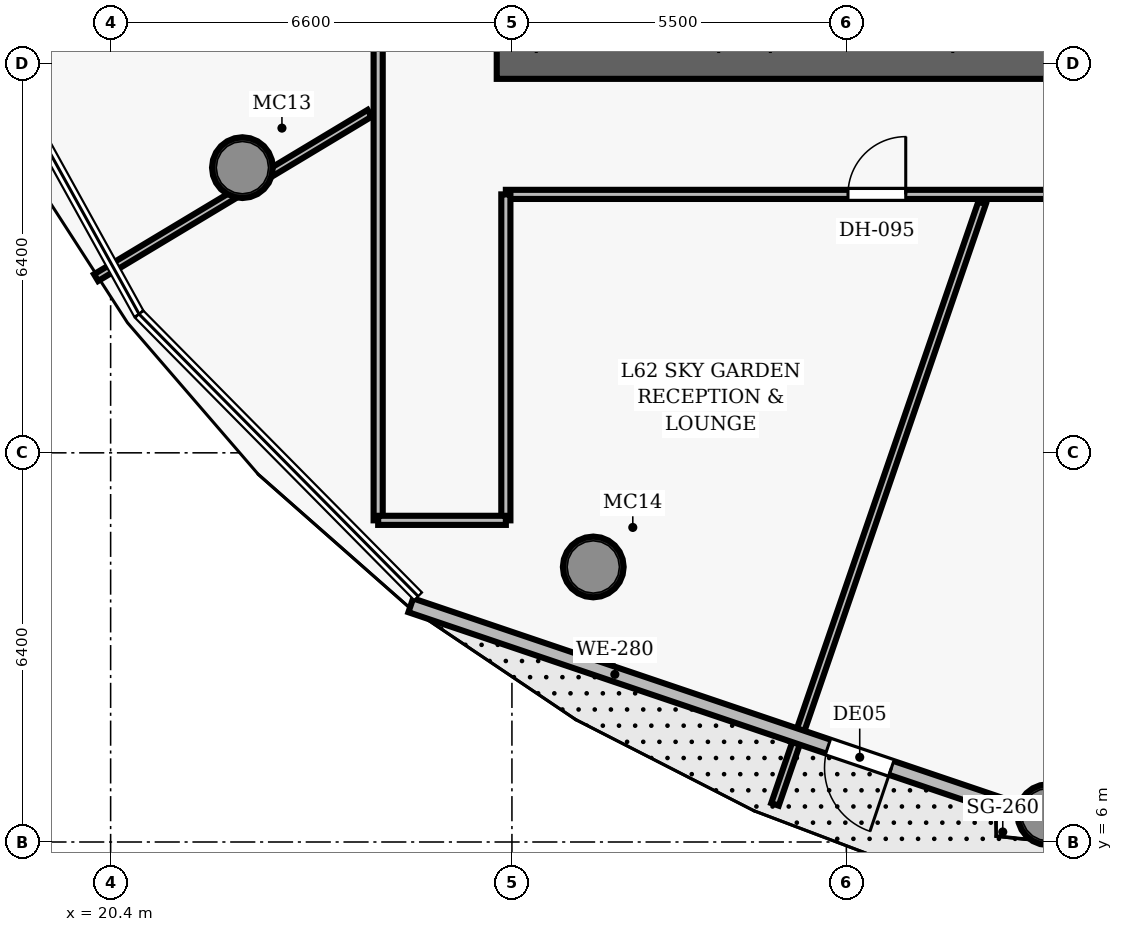
"""IFC4 building model, lengths in metres.
Left out: names, types, materials, properties, quantities, classifications, styles, units other than length and angle.
Written with IfcOpenShell. Run it as: python <this file> out.ifc"""

import sys

from ifc_helpers import new_model, si_unit, direction, frame, frame_2d, origin, origin_2d, place, context, subcontext, project, spatial, rectangle, hollow_circle, extrude, element, fill, save


model = new_model("IFC4")
c1 = context("Model", 3, precision=1e-05, world=origin(), true_north=direction((0.0, 1.0)))
c2 = subcontext(c1, "Body", "Model", "MODEL_VIEW")
j1 = project(units=[si_unit("LENGTHUNIT", "METRE"), si_unit("PLANEANGLEUNIT", "RADIAN")], contexts=[c1])
p1 = place(None, origin())
s1 = spatial("IfcSite", under=j1, at=p1, CompositionType="ELEMENT")
p2 = place(p1, origin())
s2 = spatial("IfcBuilding", under=s1, at=p2, CompositionType="ELEMENT")
p3 = place(p2, frame((0.0, 0.0, 245.9)))
s3 = spatial("IfcBuildingStorey", under=s2, at=p3, CompositionType="ELEMENT", Elevation=245.9)
p4 = place(p3, frame((26.75, 18.8, 0.0), z_axis=(0.0, 0.0, 1.0), x_axis=(1.0, 0.0, 0.0)))
e1 = element("IfcWall", 1, at=p4, inside=s3, PredefinedType="SHEAR", context=c2, shape_type="SweptSolid", body=[
    extrude(rectangle(XDim=22.5, YDim=0.5, at=frame_2d((11.25, 0.0))), origin(), (0.0, 0.0, 1.0), 3.85),
])
p5 = place(p4, frame((14.47, 0.0, 0.0)))
e2 = element("IfcOpeningElement", 2, at=p5, cuts=e1, PredefinedType="OPENING", context=c2, shape_type="SweptSolid", body=[
    extrude(rectangle(XDim=1.05, YDim=2.15, at=frame_2d((0.525, 1.075))), frame((0.0, 0.26, 0.0), z_axis=(0.0, -1.0, 0.0), x_axis=(1.0, 0.0, 0.0)), (0.0, 0.0, 1.0), 0.52),
])
for number, where, z_axis, x_axis in (
    (3, (22.567, 17.09, 0.0), (0.0, 0.0, 1.0), (1.0, 0.0, 0.0)),
    (4, (28.338, 10.523, 0.0), (0.0, 0.0, 1.0), (1.0, 0.0, 0.0)),
    (5, (35.815, 6.449, 0.0), (0.0, 0.0, 1.0), (1.0, 0.0, 0.0)),
):
    element("IfcColumn", number, at=place(p3, frame(where, z_axis=z_axis, x_axis=x_axis)), inside=s3, PredefinedType="COLUMN", context=c2, shape_type="SweptSolid", body=[
        extrude(hollow_circle(Radius=0.5, WallThickness=0.045, at=origin_2d()), origin(), (0.0, 0.0, 1.0), 3.85),
    ])
p6 = place(p3, frame((26.9, 16.65, 0.0), z_axis=(0.0, 0.0, 1.0), x_axis=(1.0, 0.0, 0.0)))
e6 = element("IfcWall", 6, at=p6, inside=s3, PredefinedType="PARTITIONING", context=c2, shape_type="SweptSolid", body=[
    extrude(rectangle(XDim=22.2, YDim=0.15, at=frame_2d((11.1, 0.0))), origin(), (0.0, 0.0, 1.0), 3.04),
])
p7 = place(p6, frame((5.627, 0.0, 0.0)))
e7 = element("IfcOpeningElement", 7, at=p7, cuts=e6, PredefinedType="OPENING", context=c2, shape_type="SweptSolid", body=[
    extrude(rectangle(XDim=0.95, YDim=2.15, at=frame_2d((0.475, 1.075))), frame((0.0, 0.085, 0.0), z_axis=(0.0, -1.0, 0.0), x_axis=(1.0, 0.0, 0.0)), (0.0, 0.0, 1.0), 0.17),
])
p8 = place(p6, frame((12.684, 0.0, 0.0)))
e8 = element("IfcOpeningElement", 8, at=p8, cuts=e6, PredefinedType="OPENING", context=c2, shape_type="SweptSolid", body=[
    extrude(rectangle(XDim=0.95, YDim=2.15, at=frame_2d((0.475, 1.075))), frame((0.0, 0.085, 0.0), z_axis=(0.0, -1.0, 0.0), x_axis=(1.0, 0.0, 0.0)), (0.0, 0.0, 1.0), 0.17),
])
p9 = place(p6, frame((15.904, 0.0, 0.0)))
e9 = element("IfcOpeningElement", 9, at=p9, cuts=e6, PredefinedType="OPENING", context=c2, shape_type="SweptSolid", body=[
    extrude(rectangle(XDim=0.95, YDim=2.15, at=frame_2d((0.475, 1.075))), frame((0.0, 0.085, 0.0), z_axis=(0.0, -1.0, 0.0), x_axis=(1.0, 0.0, 0.0)), (0.0, 0.0, 1.0), 0.17),
])
p10 = place(p3, frame((24.8, 11.29, 0.0), z_axis=(0.0, 0.0, 1.0), x_axis=(0.0, 1.0, 0.0)))
e10 = element("IfcWall", 10, at=p10, inside=s3, PredefinedType="PARTITIONING", context=c2, shape_type="SweptSolid", body=[
    extrude(rectangle(XDim=30.11, YDim=0.15, at=frame_2d((15.055, 0.0))), origin(), (0.0, 0.0, 1.0), 3.04),
])
p11 = place(p10, frame((19.445, 0.0, 0.0)))
e11 = element("IfcOpeningElement", 11, at=p11, cuts=e10, PredefinedType="OPENING", context=c2, shape_type="SweptSolid", body=[
    extrude(rectangle(XDim=0.95, YDim=2.15, at=frame_2d((0.475, 1.075))), frame((0.0, 0.085, 0.0), z_axis=(0.0, -1.0, 0.0), x_axis=(1.0, 0.0, 0.0)), (0.0, 0.0, 1.0), 0.17),
])
p12 = place(p10, frame((11.011, 0.0, 0.0)))
e12 = element("IfcOpeningElement", 12, at=p12, cuts=e10, PredefinedType="OPENING", context=c2, shape_type="SweptSolid", body=[
    extrude(rectangle(XDim=1.5, YDim=2.2, at=frame_2d((0.75, 1.1))), frame((0.0, 0.085, 0.0), z_axis=(0.0, -1.0, 0.0), x_axis=(1.0, 0.0, 0.0)), (0.0, 0.0, 1.0), 0.17),
])
p13 = place(p3, frame((26.9, 11.29, 0.0), z_axis=(0.0, 0.0, 1.0), x_axis=(0.0, 1.0, 0.0)))
e13 = element("IfcWall", 13, at=p13, inside=s3, PredefinedType="PARTITIONING", context=c2, shape_type="SweptSolid", body=[
    extrude(rectangle(XDim=5.36, YDim=0.15, at=frame_2d((2.68, 0.0))), origin(), (0.0, 0.0, 1.0), 3.04),
])
p14 = place(p3, frame((24.8, 11.29, 0.0), z_axis=(0.0, 0.0, 1.0), x_axis=(1.0, 0.0, 0.0)))
e14 = element("IfcWall", 14, at=p14, inside=s3, PredefinedType="PARTITIONING", context=c2, shape_type="SweptSolid", body=[
    extrude(rectangle(XDim=2.1, YDim=0.15, at=frame_2d((1.05, 0.0))), origin(), (0.0, 0.0, 1.0), 3.04),
])
p15 = place(p3, frame((24.66, 17.985, 0.0), z_axis=(0.0, 0.0, 1.0), x_axis=(-0.857152112753, -0.515063351057, 0.0)))
e15 = element("IfcWall", 15, at=p15, inside=s3, PredefinedType="PARTITIONING", context=c2, shape_type="SweptSolid", body=[
    extrude(rectangle(XDim=5.249, YDim=0.13, at=frame_2d((2.625, 0.0))), origin(), (0.0, 0.0, 1.0), 3.04),
])
p16 = place(p3, frame((34.732, 16.51, 0.0), z_axis=(0.0, 0.0, 1.0), x_axis=(-0.325579978914, -0.945514504029, 0.0)))
e16 = element("IfcWall", 16, at=p16, inside=s3, PredefinedType="PARTITIONING", context=c2, shape_type="SweptSolid", body=[
    extrude(rectangle(XDim=10.461, YDim=0.13, at=frame_2d((5.231, 0.0))), origin(), (0.0, 0.0, 1.0), 3.04),
])
p17 = place(p3, frame((37.101, 5.911, 0.0), z_axis=(0.0, 0.0, 1.0), x_axis=(-0.947242597845, 0.320517489115, 0.0)))
e17 = element("IfcWall", 17, at=p17, inside=s3, PredefinedType="SOLIDWALL", context=c2, shape_type="SweptSolid", body=[
    extrude(rectangle(XDim=12.42, YDim=0.24, at=frame_2d((6.21, 0.0))), origin(), (0.0, 0.0, 1.0), 2.8),
])
p18 = place(p17, frame((4.075, 0.0, 0.0)))
e18 = element("IfcOpeningElement", 18, at=p18, cuts=e17, PredefinedType="OPENING", context=c2, shape_type="SweptSolid", body=[
    extrude(rectangle(XDim=1.1, YDim=2.2, at=frame_2d((0.55, 1.1))), frame((0.0, 0.13, 0.0), z_axis=(0.0, -1.0, 0.0), x_axis=(1.0, 0.0, 0.0)), (0.0, 0.0, 1.0), 0.26),
])
p19 = place(p7, origin())
e19 = element("IfcDoor", 19, at=p19, inside=s3, OperationType="SINGLE_SWING_RIGHT", PredefinedType="DOOR", context=c2, shape_type="SweptSolid", body=[
    extrude(rectangle(XDim=0.95, YDim=2.15, at=frame_2d((0.475, 1.075))), frame((0.0, 0.025, 0.0), z_axis=(0.0, -1.0, 0.0), x_axis=(1.0, 0.0, 0.0)), (0.0, 0.0, 1.0), 0.05),
])
fill(e7, e19)
p20 = place(p18, origin())
e20 = element("IfcDoor", 20, at=p20, inside=s3, OperationType="SINGLE_SWING_LEFT", PredefinedType="DOOR", context=c2, shape_type="SweptSolid", body=[
    extrude(rectangle(XDim=1.1, YDim=2.2, at=frame_2d((0.55, 1.1))), frame((0.0, 0.025, 0.0), z_axis=(0.0, -1.0, 0.0), x_axis=(1.0, 0.0, 0.0)), (0.0, 0.0, 1.0), 0.05),
])
fill(e18, e20)
save(model, sys.argv[1])
